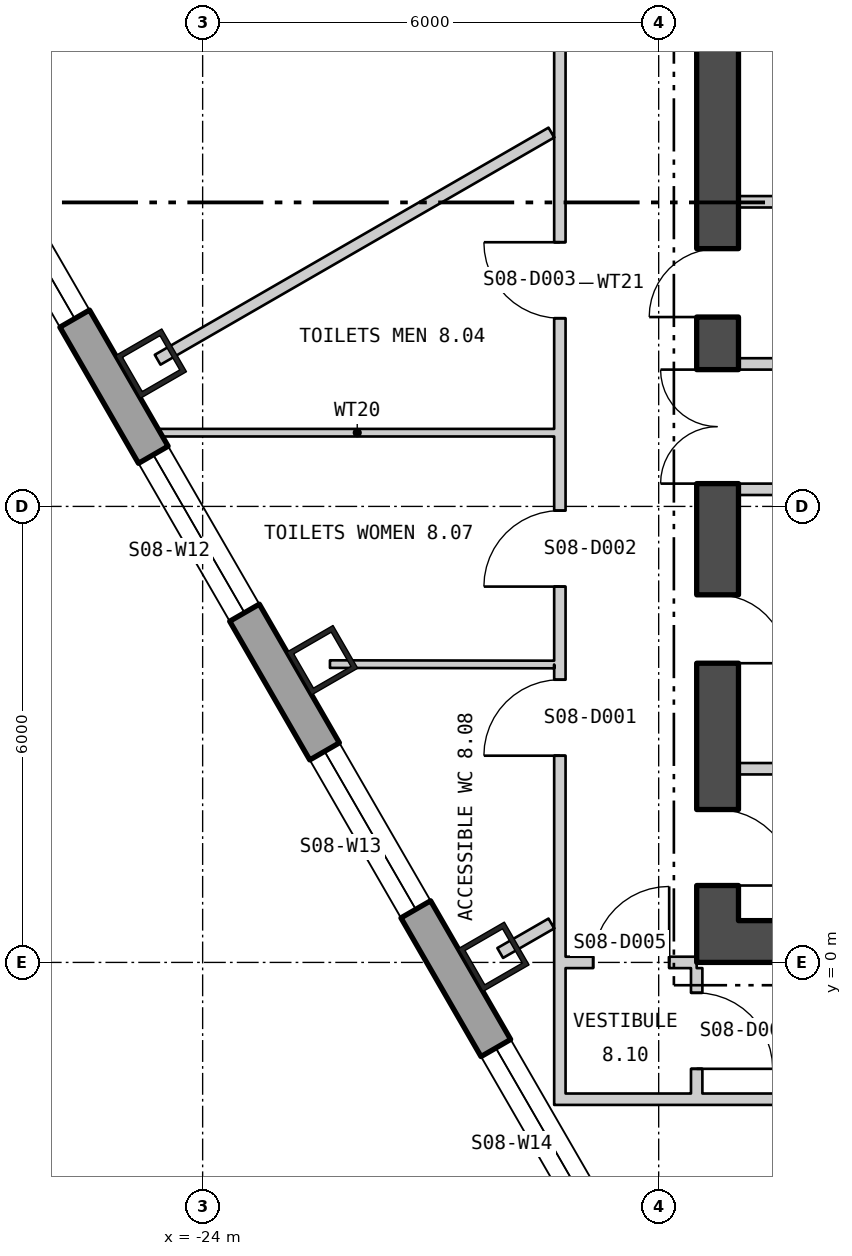
"""IFC4 building model, lengths in metres.
Left out: names, types, materials, properties, quantities, classifications, styles, units other than length and angle.
Written with IfcOpenShell. Run it as: python <this file> out.ifc"""

import sys

from ifc_helpers import new_model, si_unit, direction, frame, frame_2d, origin, origin_2d, place, context, subcontext, project, spatial, polyline, rectangle, hollow_rectangle, outline, extrude, element, fill, save


model = new_model("IFC4")
c1 = context("Model", 3, precision=1e-05, world=origin(), true_north=direction((0.0, 1.0)))
c2 = subcontext(c1, "Body", "Model", "MODEL_VIEW")
j1 = project(units=[si_unit("LENGTHUNIT", "METRE"), si_unit("PLANEANGLEUNIT", "RADIAN")], contexts=[c1])
p1 = place(None, origin())
s1 = spatial("IfcSite", under=j1, at=p1, CompositionType="ELEMENT")
p2 = place(p1, origin())
s2 = spatial("IfcBuilding", under=s1, at=p2, CompositionType="ELEMENT")
p3 = place(p2, frame((0.0, 0.0, 111.3)))
s3 = spatial("IfcBuildingStorey", under=s2, at=p3, CompositionType="ELEMENT", Elevation=111.3)
for number, where, z_axis, x_axis in (
    (1, (-24.678, 7.879, 0.0), (0.0, 0.0, 1.0), (0.5, -0.866, 0.0)),
    (2, (-22.425, 3.977, 0.0), (0.0, 0.0, 1.0), (0.5, -0.866, 0.0)),
    (3, (-20.171, 0.074, 0.0), (0.0, 0.0, 1.0), (0.5, -0.866, 0.0)),
):
    element("IfcColumn", number, at=place(p3, frame(where, z_axis=z_axis, x_axis=x_axis)), inside=s3, PredefinedType="COLUMN", context=c2, shape_type="SweptSolid", body=[
        extrude(hollow_rectangle(XDim=0.65, YDim=0.7, WallThickness=0.065, at=origin_2d()), origin(), (0.0, 0.0, 1.0), 4.5),
    ])
p4 = place(p3, frame((-22.869, 19.977, -0.4), z_axis=(0.0, 0.0, 1.0), x_axis=(-0.499998788182, -0.866026103427, 0.0)))
e4 = element("IfcWall", 4, at=p4, inside=s3, PredefinedType="SOLIDWALL", context=c2, shape_type="SweptSolid", body=[
    extrude(outline(polyline([(-0.13, -0.225), (9.59, -0.225), (9.33, 0.225), (0.13, 0.225), (-0.13, -0.225)])), origin(), (0.0, 0.0, 1.0), 4.5),
])
p5 = place(p4, frame((1.669, 0.0, 1.3)))
e5 = element("IfcOpeningElement", 5, at=p5, cuts=e4, PredefinedType="OPENING", context=c2, shape_type="SweptSolid", body=[
    extrude(rectangle(XDim=1.8, YDim=2.6, at=frame_2d((0.9, 1.3))), frame((0.0, 0.235, 0.0), z_axis=(0.0, -1.0, 0.0), x_axis=(1.0, 0.0, 0.0)), (0.0, 0.0, 1.0), 0.47),
])
p6 = place(p4, frame((5.991, 0.0, 1.3)))
e6 = element("IfcOpeningElement", 6, at=p6, cuts=e4, PredefinedType="OPENING", context=c2, shape_type="SweptSolid", body=[
    extrude(rectangle(XDim=1.8, YDim=2.6, at=frame_2d((0.9, 1.3))), frame((0.0, 0.235, 0.0), z_axis=(0.0, -1.0, 0.0), x_axis=(1.0, 0.0, 0.0)), (0.0, 0.0, 1.0), 0.47),
])
p7 = place(p3, frame((-27.595, 11.782, -0.18), z_axis=(0.0, 0.0, 1.0), x_axis=(0.500000141277, -0.866025322218, 0.0)))
e7 = element("IfcWall", 7, at=p7, inside=s3, PredefinedType="SOLIDWALL", context=c2, shape_type="SweptSolid", body=[
    extrude(outline(polyline([(-0.13, -0.225), (45.86, -0.225), (45.6, 0.225), (0.13, 0.225), (-0.13, -0.225)])), origin(), (0.0, 0.0, 1.0), 4.28),
])
p8 = place(p7, frame((1.424, 0.0, 1.08)))
e8 = element("IfcOpeningElement", 8, at=p8, cuts=e7, PredefinedType="OPENING", context=c2, shape_type="SweptSolid", body=[
    extrude(rectangle(XDim=2.4, YDim=2.6, at=frame_2d((1.2, 1.3))), frame((0.0, 0.235, 0.0), z_axis=(0.0, -1.0, 0.0), x_axis=(1.0, 0.0, 0.0)), (0.0, 0.0, 1.0), 0.47),
])
p9 = place(p7, frame((5.892, 0.0, 1.08)))
e9 = element("IfcOpeningElement", 9, at=p9, cuts=e7, PredefinedType="OPENING", context=c2, shape_type="SweptSolid", body=[
    extrude(rectangle(XDim=2.4, YDim=2.6, at=frame_2d((1.2, 1.3))), frame((0.0, 0.235, 0.0), z_axis=(0.0, -1.0, 0.0), x_axis=(1.0, 0.0, 0.0)), (0.0, 0.0, 1.0), 0.47),
])
p10 = place(p7, frame((10.399, 0.0, 1.08)))
e10 = element("IfcOpeningElement", 10, at=p10, cuts=e7, PredefinedType="OPENING", context=c2, shape_type="SweptSolid", body=[
    extrude(rectangle(XDim=2.4, YDim=2.6, at=frame_2d((1.2, 1.3))), frame((0.0, 0.235, 0.0), z_axis=(0.0, -1.0, 0.0), x_axis=(1.0, 0.0, 0.0)), (0.0, 0.0, 1.0), 0.47),
])
p11 = place(p7, frame((14.905, 0.0, 1.08)))
e11 = element("IfcOpeningElement", 11, at=p11, cuts=e7, PredefinedType="OPENING", context=c2, shape_type="SweptSolid", body=[
    extrude(rectangle(XDim=2.4, YDim=2.6, at=frame_2d((1.2, 1.3))), frame((0.0, 0.235, 0.0), z_axis=(0.0, -1.0, 0.0), x_axis=(1.0, 0.0, 0.0)), (0.0, 0.0, 1.0), 0.47),
])
p12 = place(p7, frame((19.412, 0.0, 1.08)))
e12 = element("IfcOpeningElement", 12, at=p12, cuts=e7, PredefinedType="OPENING", context=c2, shape_type="SweptSolid", body=[
    extrude(rectangle(XDim=2.4, YDim=2.6, at=frame_2d((1.2, 1.3))), frame((0.0, 0.235, 0.0), z_axis=(0.0, -1.0, 0.0), x_axis=(1.0, 0.0, 0.0)), (0.0, 0.0, 1.0), 0.47),
])
p13 = place(p7, frame((23.918, 0.0, 1.08)))
e13 = element("IfcOpeningElement", 13, at=p13, cuts=e7, PredefinedType="OPENING", context=c2, shape_type="SweptSolid", body=[
    extrude(rectangle(XDim=2.4, YDim=2.6, at=frame_2d((1.2, 1.3))), frame((0.0, 0.235, 0.0), z_axis=(0.0, -1.0, 0.0), x_axis=(1.0, 0.0, 0.0)), (0.0, 0.0, 1.0), 0.47),
])
p14 = place(p7, frame((28.425, 0.0, 1.08)))
e14 = element("IfcOpeningElement", 14, at=p14, cuts=e7, PredefinedType="OPENING", context=c2, shape_type="SweptSolid", body=[
    extrude(rectangle(XDim=2.4, YDim=2.6, at=frame_2d((1.2, 1.3))), frame((0.0, 0.235, 0.0), z_axis=(0.0, -1.0, 0.0), x_axis=(1.0, 0.0, 0.0)), (0.0, 0.0, 1.0), 0.47),
])
p15 = place(p7, frame((32.932, 0.0, 1.08)))
e15 = element("IfcOpeningElement", 15, at=p15, cuts=e7, PredefinedType="OPENING", context=c2, shape_type="SweptSolid", body=[
    extrude(rectangle(XDim=2.4, YDim=2.6, at=frame_2d((1.2, 1.3))), frame((0.0, 0.235, 0.0), z_axis=(0.0, -1.0, 0.0), x_axis=(1.0, 0.0, 0.0)), (0.0, 0.0, 1.0), 0.47),
])
p16 = place(p7, frame((37.438, 0.0, 1.08)))
e16 = element("IfcOpeningElement", 16, at=p16, cuts=e7, PredefinedType="OPENING", context=c2, shape_type="SweptSolid", body=[
    extrude(rectangle(XDim=2.4, YDim=2.6, at=frame_2d((1.2, 1.3))), frame((0.0, 0.235, 0.0), z_axis=(0.0, -1.0, 0.0), x_axis=(1.0, 0.0, 0.0)), (0.0, 0.0, 1.0), 0.47),
])
p17 = place(p7, frame((41.907, 0.0, 1.08)))
e17 = element("IfcOpeningElement", 17, at=p17, cuts=e7, PredefinedType="OPENING", context=c2, shape_type="SweptSolid", body=[
    extrude(rectangle(XDim=2.4, YDim=2.6, at=frame_2d((1.2, 1.3))), frame((0.0, 0.235, 0.0), z_axis=(0.0, -1.0, 0.0), x_axis=(1.0, 0.0, 0.0)), (0.0, 0.0, 1.0), 0.47),
])
p18 = place(p3, frame((-17.5, 0.275, 0.0), z_axis=(0.0, 0.0, 1.0), x_axis=(1.0, 0.0, 0.0)))
e18 = element("IfcWall", 18, at=p18, inside=s3, PredefinedType="SHEAR", context=c2, shape_type="SweptSolid", body=[
    extrude(rectangle(XDim=35.0, YDim=0.55, at=frame_2d((17.5, 0.0))), origin(), (0.0, 0.0, 1.0), 4.3),
])
p19 = place(p18, frame((12.0, 0.0, 0.0)))
e19 = element("IfcOpeningElement", 19, at=p19, cuts=e18, PredefinedType="OPENING", context=c2, shape_type="SweptSolid", body=[
    extrude(rectangle(XDim=1.8, YDim=2.4, at=frame_2d((0.9, 1.2))), frame((0.0, 0.285, 0.0), z_axis=(0.0, -1.0, 0.0), x_axis=(1.0, 0.0, 0.0)), (0.0, 0.0, 1.0), 0.57),
])
p20 = place(p18, frame((22.0, 0.0, 0.0)))
e20 = element("IfcOpeningElement", 20, at=p20, cuts=e18, PredefinedType="OPENING", context=c2, shape_type="SweptSolid", body=[
    extrude(rectangle(XDim=1.8, YDim=2.4, at=frame_2d((0.9, 1.2))), frame((0.0, 0.285, 0.0), z_axis=(0.0, -1.0, 0.0), x_axis=(1.0, 0.0, 0.0)), (0.0, 0.0, 1.0), 0.57),
])
p21 = place(p3, frame((-17.225, 0.55, 0.0), z_axis=(0.0, 0.0, 1.0), x_axis=(0.0, 1.0, 0.0)))
e21 = element("IfcWall", 21, at=p21, inside=s3, PredefinedType="SHEAR", context=c2, shape_type="SweptSolid", body=[
    extrude(rectangle(XDim=16.9, YDim=0.55, at=frame_2d((8.45, 0.0))), origin(), (0.0, 0.0, 1.0), 4.3),
])
p22 = place(p21, frame((5.75, 0.0, 0.0)))
e22 = element("IfcOpeningElement", 22, at=p22, cuts=e21, PredefinedType="OPENING", context=c2, shape_type="SweptSolid", body=[
    extrude(rectangle(XDim=1.5, YDim=2.1, at=frame_2d((0.75, 1.05))), frame((0.0, 0.285, 0.0), z_axis=(0.0, -1.0, 0.0), x_axis=(1.0, 0.0, 0.0)), (0.0, 0.0, 1.0), 0.57),
])
p23 = place(p21, frame((0.462, 0.0, 0.0)))
e23 = element("IfcOpeningElement", 23, at=p23, cuts=e21, PredefinedType="OPENING", context=c2, shape_type="SweptSolid", body=[
    extrude(rectangle(XDim=1.0, YDim=2.1, at=frame_2d((0.5, 1.05))), frame((0.0, 0.285, 0.0), z_axis=(0.0, -1.0, 0.0), x_axis=(1.0, 0.0, 0.0)), (0.0, 0.0, 1.0), 0.57),
])
p24 = place(p21, frame((3.387, 0.0, 0.0)))
e24 = element("IfcOpeningElement", 24, at=p24, cuts=e21, PredefinedType="OPENING", context=c2, shape_type="SweptSolid", body=[
    extrude(rectangle(XDim=0.9, YDim=2.1, at=frame_2d((0.45, 1.05))), frame((0.0, 0.285, 0.0), z_axis=(0.0, -1.0, 0.0), x_axis=(1.0, 0.0, 0.0)), (0.0, 0.0, 1.0), 0.57),
])
p25 = place(p21, frame((7.942, 0.0, 0.0)))
e25 = element("IfcOpeningElement", 25, at=p25, cuts=e21, PredefinedType="OPENING", context=c2, shape_type="SweptSolid", body=[
    extrude(rectangle(XDim=0.9, YDim=2.1, at=frame_2d((0.45, 1.05))), frame((0.0, 0.285, 0.0), z_axis=(0.0, -1.0, 0.0), x_axis=(1.0, 0.0, 0.0)), (0.0, 0.0, 1.0), 0.57),
])
p26 = place(p21, frame((12.767, 0.0, 0.0)))
e26 = element("IfcOpeningElement", 26, at=p26, cuts=e21, PredefinedType="OPENING", context=c2, shape_type="SweptSolid", body=[
    extrude(rectangle(XDim=0.9, YDim=2.1, at=frame_2d((0.45, 1.05))), frame((0.0, 0.285, 0.0), z_axis=(0.0, -1.0, 0.0), x_axis=(1.0, 0.0, 0.0)), (0.0, 0.0, 1.0), 0.57),
])
for number, where, z_axis, x_axis in (
    (27, (-16.95, 6.225, 0.0), (0.0, 0.0, 1.0), (1.0, 0.0, 0.0)),
    (28, (-16.95, 7.875, 0.0), (0.0, 0.0, 1.0), (1.0, 0.0, 0.0)),
    (29, (-16.95, 2.549, 0.0), (0.0, 0.0, 1.0), (1.0, 0.0, 0.0)),
    (30, (-16.95, 10.008, 0.0), (0.0, 0.0, 1.0), (1.0, 0.0, 0.0)),
):
    element("IfcWall", number, at=place(p3, frame(where, z_axis=z_axis, x_axis=x_axis)), inside=s3, PredefinedType="PARTITIONING", context=c2, shape_type="SweptSolid", body=[
        extrude(rectangle(XDim=2.45, YDim=0.15, at=frame_2d((1.225, 0.0))), origin(), (0.0, 0.0, 1.0), 4.3),
    ])
p27 = place(p3, frame((-24.592, 7.93, 0.0), z_axis=(0.0, 0.0, 1.0), x_axis=(0.866146611104, 0.499790003975, 0.0)))
e31 = element("IfcWall", 31, at=p27, inside=s3, PredefinedType="PARTITIONING", context=c2, shape_type="SweptSolid", body=[
    extrude(rectangle(XDim=5.981, YDim=0.15, at=frame_2d((2.99, 0.0))), origin(), (0.0, 0.0, 1.0), 4.3),
])
p28 = place(p3, frame((-24.557, 6.97, 0.0), z_axis=(0.0, 0.0, 1.0), x_axis=(1.0, 0.0, 0.0)))
e32 = element("IfcWall", 32, at=p28, inside=s3, PredefinedType="PARTITIONING", context=c2, shape_type="SweptSolid", body=[
    extrude(rectangle(XDim=5.182, YDim=0.1, at=frame_2d((2.591, 0.0))), origin(), (0.0, 0.0, 1.0), 4.3),
])
p29 = place(p3, frame((-22.325, 3.925, 0.0), z_axis=(0.0, 0.0, 1.0), x_axis=(0.999998563634, -0.00169491282, 0.0)))
e33 = element("IfcWall", 33, at=p29, inside=s3, PredefinedType="PARTITIONING", context=c2, shape_type="SweptSolid", body=[
    extrude(rectangle(XDim=2.95, YDim=0.1, at=frame_2d((1.475, 0.0))), origin(), (0.0, 0.0, 1.0), 4.3),
])
p30 = place(p3, frame((-20.085, 0.124, 0.0), z_axis=(0.0, 0.0, 1.0), x_axis=(0.86633556233, 0.499462404434, 0.0)))
e34 = element("IfcWall", 34, at=p30, inside=s3, PredefinedType="PARTITIONING", context=c2, shape_type="SweptSolid", body=[
    extrude(rectangle(XDim=0.777, YDim=0.15, at=frame_2d((0.388, 0.0))), origin(), (0.0, 0.0, 1.0), 4.3),
])
p31 = place(p3, frame((-19.3, -1.875, 0.0), z_axis=(0.0, 0.0, 1.0), x_axis=(0.0, 1.0, 0.0)))
e35 = element("IfcWall", 35, at=p31, inside=s3, PredefinedType="PARTITIONING", context=c2, shape_type="SweptSolid", body=[
    extrude(rectangle(XDim=21.622, YDim=0.15, at=frame_2d((10.811, 0.0))), origin(), (0.0, 0.0, 1.0), 4.3),
])
p32 = place(p31, frame((4.595, 0.0, 0.0)))
e36 = element("IfcOpeningElement", 36, at=p32, cuts=e35, PredefinedType="OPENING", context=c2, shape_type="SweptSolid", body=[
    extrude(rectangle(XDim=1.0, YDim=2.1, at=frame_2d((0.5, 1.05))), frame((0.0, 0.085, 0.0), z_axis=(0.0, -1.0, 0.0), x_axis=(1.0, 0.0, 0.0)), (0.0, 0.0, 1.0), 0.17),
])
p33 = place(p31, frame((6.82, 0.0, 0.0)))
e37 = element("IfcOpeningElement", 37, at=p33, cuts=e35, PredefinedType="OPENING", context=c2, shape_type="SweptSolid", body=[
    extrude(rectangle(XDim=1.0, YDim=2.1, at=frame_2d((0.5, 1.05))), frame((0.0, 0.085, 0.0), z_axis=(0.0, -1.0, 0.0), x_axis=(1.0, 0.0, 0.0)), (0.0, 0.0, 1.0), 0.17),
])
p34 = place(p31, frame((10.351, 0.0, 0.0)))
e38 = element("IfcOpeningElement", 38, at=p34, cuts=e35, PredefinedType="OPENING", context=c2, shape_type="SweptSolid", body=[
    extrude(rectangle(XDim=1.0, YDim=2.1, at=frame_2d((0.5, 1.05))), frame((0.0, 0.085, 0.0), z_axis=(0.0, -1.0, 0.0), x_axis=(1.0, 0.0, 0.0)), (0.0, 0.0, 1.0), 0.17),
])
p35 = place(p31, frame((16.565, 0.0, 0.0)))
e39 = element("IfcOpeningElement", 39, at=p35, cuts=e35, PredefinedType="OPENING", context=c2, shape_type="SweptSolid", body=[
    extrude(rectangle(XDim=1.0, YDim=2.1, at=frame_2d((0.5, 1.05))), frame((0.0, 0.085, 0.0), z_axis=(0.0, -1.0, 0.0), x_axis=(1.0, 0.0, 0.0)), (0.0, 0.0, 1.0), 0.17),
])
p36 = place(p3, frame((-19.225, -1.8, 0.0), z_axis=(0.0, 0.0, 1.0), x_axis=(1.0, 0.0, 0.0)))
e40 = element("IfcWall", 40, at=p36, inside=s3, PredefinedType="PARTITIONING", context=c2, shape_type="SweptSolid", body=[
    extrude(rectangle(XDim=11.72, YDim=0.15, at=frame_2d((5.86, 0.0))), origin(), (0.0, 0.0, 1.0), 4.3),
])
p37 = place(p3, frame((-19.225, 0.0, 0.0), z_axis=(0.0, 0.0, 1.0), x_axis=(1.0, 0.0, 0.0)))
e41 = element("IfcWall", 41, at=p37, inside=s3, PredefinedType="PARTITIONING", context=c2, shape_type="SweptSolid", body=[
    extrude(rectangle(XDim=1.725, YDim=0.15, at=frame_2d((0.863, 0.0))), origin(), (0.0, 0.0, 1.0), 3.7),
])
p38 = place(p37, frame((0.363, 0.0, 0.0)))
e42 = element("IfcOpeningElement", 42, at=p38, cuts=e41, PredefinedType="OPENING", context=c2, shape_type="SweptSolid", body=[
    extrude(rectangle(XDim=1.0, YDim=2.1, at=frame_2d((0.5, 1.05))), frame((0.0, 0.085, 0.0), z_axis=(0.0, -1.0, 0.0), x_axis=(1.0, 0.0, 0.0)), (0.0, 0.0, 1.0), 0.17),
])
p39 = place(p3, frame((-17.5, -1.725, 0.0), z_axis=(0.0, 0.0, 1.0), x_axis=(0.0, 1.0, 0.0)))
e43 = element("IfcWall", 43, at=p39, inside=s3, PredefinedType="PARTITIONING", context=c2, shape_type="SweptSolid", body=[
    extrude(rectangle(XDim=1.65, YDim=0.15, at=frame_2d((0.825, 0.0))), origin(), (0.0, 0.0, 1.0), 4.3),
])
p40 = place(p39, frame((0.325, 0.0, 0.0)))
e44 = element("IfcOpeningElement", 44, at=p40, cuts=e43, PredefinedType="OPENING", context=c2, shape_type="SweptSolid", body=[
    extrude(rectangle(XDim=1.0, YDim=2.1, at=frame_2d((0.5, 1.05))), frame((0.0, 0.085, 0.0), z_axis=(0.0, -1.0, 0.0), x_axis=(1.0, 0.0, 0.0)), (0.0, 0.0, 1.0), 0.17),
])
p41 = place(p8, origin())
e45 = element("IfcWindow", 45, at=p41, inside=s3, PartitioningType="SINGLE_PANEL", PredefinedType="WINDOW", context=c2, shape_type="SweptSolid", body=[
    extrude(rectangle(XDim=2.4, YDim=2.6, at=frame_2d((1.2, 1.3))), frame((0.0, 0.105, 0.0), z_axis=(0.0, -1.0, 0.0), x_axis=(1.0, 0.0, 0.0)), (0.0, 0.0, 1.0), 0.06),
])
fill(e8, e45)
p42 = place(p9, origin())
e46 = element("IfcWindow", 46, at=p42, inside=s3, PartitioningType="SINGLE_PANEL", PredefinedType="WINDOW", context=c2, shape_type="SweptSolid", body=[
    extrude(rectangle(XDim=2.4, YDim=2.6, at=frame_2d((1.2, 1.3))), frame((0.0, 0.105, 0.0), z_axis=(0.0, -1.0, 0.0), x_axis=(1.0, 0.0, 0.0)), (0.0, 0.0, 1.0), 0.06),
])
fill(e9, e46)
p43 = place(p10, origin())
e47 = element("IfcWindow", 47, at=p43, inside=s3, PartitioningType="SINGLE_PANEL", PredefinedType="WINDOW", context=c2, shape_type="SweptSolid", body=[
    extrude(rectangle(XDim=2.4, YDim=2.6, at=frame_2d((1.2, 1.3))), frame((0.0, 0.105, 0.0), z_axis=(0.0, -1.0, 0.0), x_axis=(1.0, 0.0, 0.0)), (0.0, 0.0, 1.0), 0.06),
])
fill(e10, e47)
p44 = place(p11, origin())
e48 = element("IfcWindow", 48, at=p44, inside=s3, PartitioningType="SINGLE_PANEL", PredefinedType="WINDOW", context=c2, shape_type="SweptSolid", body=[
    extrude(rectangle(XDim=2.4, YDim=2.6, at=frame_2d((1.2, 1.3))), frame((0.0, 0.105, 0.0), z_axis=(0.0, -1.0, 0.0), x_axis=(1.0, 0.0, 0.0)), (0.0, 0.0, 1.0), 0.06),
])
fill(e11, e48)
p45 = place(p22, origin())
e49 = element("IfcDoor", 49, at=p45, inside=s3, OperationType="DOUBLE_DOOR_SINGLE_SWING", PredefinedType="DOOR", context=c2, shape_type="SweptSolid", body=[
    extrude(rectangle(XDim=1.5, YDim=2.1, at=frame_2d((0.75, 1.05))), frame((0.0, 0.025, 0.0), z_axis=(0.0, -1.0, 0.0), x_axis=(1.0, 0.0, 0.0)), (0.0, 0.0, 1.0), 0.05),
])
fill(e22, e49)
p46 = place(p23, origin())
e50 = element("IfcDoor", 50, at=p46, inside=s3, OperationType="SINGLE_SWING_LEFT", PredefinedType="DOOR", context=c2, shape_type="SweptSolid", body=[
    extrude(rectangle(XDim=1.0, YDim=2.1, at=frame_2d((0.5, 1.05))), frame((0.0, 0.025, 0.0), z_axis=(0.0, -1.0, 0.0), x_axis=(1.0, 0.0, 0.0)), (0.0, 0.0, 1.0), 0.05),
])
fill(e23, e50)
p47 = place(p24, origin())
e51 = element("IfcDoor", 51, at=p47, inside=s3, OperationType="SINGLE_SWING_LEFT", PredefinedType="DOOR", context=c2, shape_type="SweptSolid", body=[
    extrude(rectangle(XDim=0.9, YDim=2.1, at=frame_2d((0.45, 1.05))), frame((0.0, 0.025, 0.0), z_axis=(0.0, -1.0, 0.0), x_axis=(1.0, 0.0, 0.0)), (0.0, 0.0, 1.0), 0.05),
])
fill(e24, e51)
p48 = place(p25, origin())
e52 = element("IfcDoor", 52, at=p48, inside=s3, OperationType="SINGLE_SWING_RIGHT", PredefinedType="DOOR", context=c2, shape_type="SweptSolid", body=[
    extrude(rectangle(XDim=0.9, YDim=2.1, at=frame_2d((0.45, 1.05))), frame((0.0, 0.025, 0.0), z_axis=(0.0, -1.0, 0.0), x_axis=(1.0, 0.0, 0.0)), (0.0, 0.0, 1.0), 0.05),
])
fill(e25, e52)
p49 = place(p32, origin())
e53 = element("IfcDoor", 53, at=p49, inside=s3, OperationType="SINGLE_SWING_RIGHT", PredefinedType="DOOR", context=c2, shape_type="SweptSolid", body=[
    extrude(rectangle(XDim=1.0, YDim=2.1, at=frame_2d((0.5, 1.05))), frame((0.0, 0.025, 0.0), z_axis=(0.0, -1.0, 0.0), x_axis=(1.0, 0.0, 0.0)), (0.0, 0.0, 1.0), 0.05),
])
fill(e36, e53)
p50 = place(p33, origin())
e54 = element("IfcDoor", 54, at=p50, inside=s3, OperationType="SINGLE_SWING_RIGHT", PredefinedType="DOOR", context=c2, shape_type="SweptSolid", body=[
    extrude(rectangle(XDim=1.0, YDim=2.1, at=frame_2d((0.5, 1.05))), frame((0.0, 0.025, 0.0), z_axis=(0.0, -1.0, 0.0), x_axis=(1.0, 0.0, 0.0)), (0.0, 0.0, 1.0), 0.05),
])
fill(e37, e54)
p51 = place(p34, origin())
e55 = element("IfcDoor", 55, at=p51, inside=s3, OperationType="SINGLE_SWING_LEFT", PredefinedType="DOOR", context=c2, shape_type="SweptSolid", body=[
    extrude(rectangle(XDim=1.0, YDim=2.1, at=frame_2d((0.5, 1.05))), frame((0.0, 0.025, 0.0), z_axis=(0.0, -1.0, 0.0), x_axis=(1.0, 0.0, 0.0)), (0.0, 0.0, 1.0), 0.05),
])
fill(e38, e55)
p52 = place(p38, origin())
e56 = element("IfcDoor", 56, at=p52, inside=s3, OperationType="SINGLE_SWING_LEFT", PredefinedType="DOOR", context=c2, shape_type="SweptSolid", body=[
    extrude(rectangle(XDim=1.0, YDim=2.1, at=frame_2d((0.5, 1.05))), frame((0.0, 0.025, 0.0), z_axis=(0.0, -1.0, 0.0), x_axis=(1.0, 0.0, 0.0)), (0.0, 0.0, 1.0), 0.05),
])
fill(e42, e56)
p53 = place(p40, origin())
e57 = element("IfcDoor", 57, at=p53, inside=s3, OperationType="SINGLE_SWING_LEFT", PredefinedType="DOOR", context=c2, shape_type="SweptSolid", body=[
    extrude(rectangle(XDim=1.0, YDim=2.1, at=frame_2d((0.5, 1.05))), frame((0.0, 0.025, 0.0), z_axis=(0.0, -1.0, 0.0), x_axis=(1.0, 0.0, 0.0)), (0.0, 0.0, 1.0), 0.05),
])
fill(e44, e57)
save(model, sys.argv[1])
